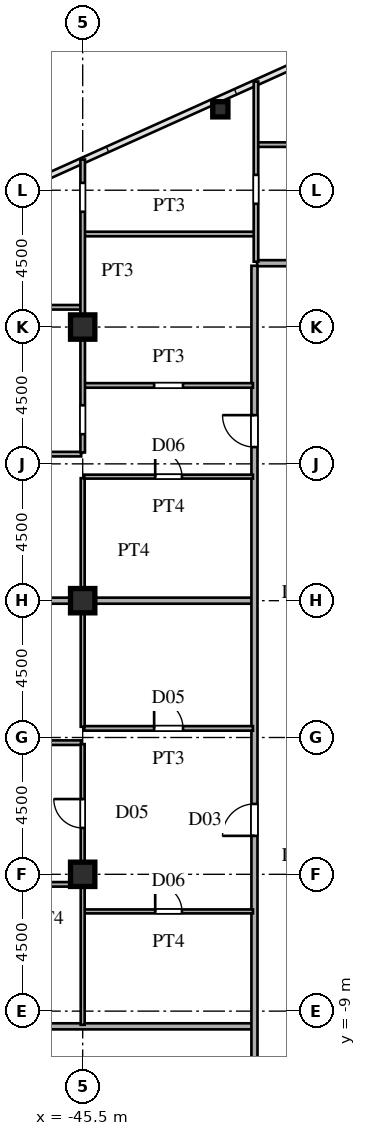
"""IFC4 building model, lengths in metres.
Left out: names, types, materials, properties, quantities, classifications, styles, units other than length and angle.
Written with IfcOpenShell. Run it as: python <this file> out.ifc"""

import sys

from ifc_helpers import new_model, si_unit, direction, frame, frame_2d, origin, origin_2d, place, context, subcontext, project, spatial, rectangle, hollow_rectangle, i_section, extrude, source, transform, mapped, element, fill, save


model = new_model("IFC4")
c1 = context("Model", 3, precision=1e-05, world=origin(), true_north=direction((0.0, 1.0)))
c2 = subcontext(c1, "Body", "Model", "MODEL_VIEW")
j1 = project(units=[si_unit("LENGTHUNIT", "METRE"), si_unit("PLANEANGLEUNIT", "RADIAN")], contexts=[c1])
p1 = place(None, origin())
s1 = spatial("IfcSite", under=j1, at=p1, CompositionType="ELEMENT")
p2 = place(p1, origin())
s2 = spatial("IfcBuilding", under=s1, at=p2, CompositionType="ELEMENT")
p3 = place(p2, frame((0.0, 0.0, 83.7)))
s3 = spatial("IfcBuildingStorey", under=s2, at=p3, CompositionType="ELEMENT", Elevation=83.7)
m1 = source(origin(), c2, "Body", "SweptSolid", [
    extrude(i_section(OverallWidth=0.8, OverallDepth=0.8, WebThickness=0.032, FlangeThickness=0.05, at=origin_2d()), origin(), (0.0, 0.0, 1.0), 3.6),
])
for number, where, z_axis, x_axis in (
    (1, (-45.5, -4.5, 0.0), (0.0, 0.0, 1.0), (1.0, 0.0, 0.0)),
    (2, (-45.5, 4.5, 0.0), (0.0, 0.0, 1.0), (1.0, 0.0, 0.0)),
    (3, (-45.5, 13.5, 0.0), (0.0, 0.0, 1.0), (1.0, 0.0, 0.0)),
):
    element("IfcColumn", number, at=place(p3, frame(where, z_axis=z_axis, x_axis=x_axis)), inside=s3, PredefinedType="COLUMN", context=c2, shape_type="MappedRepresentation", body=[
        mapped(m1, transform((0.0, 0.0, 0.0), scale=1.0)),
    ])
m2 = source(origin(), c2, "Body", "SweptSolid", [
    extrude(hollow_rectangle(XDim=0.5, YDim=0.5, WallThickness=0.02, at=origin_2d()), origin(), (0.0, 0.0, 1.0), 3.6),
])
p4 = place(p3, frame((-40.973, 20.661, 0.0), z_axis=(0.0, 0.0, 1.0), x_axis=(1.0, 0.0, 0.0)))
e4 = element("IfcColumn", 4, at=p4, inside=s3, PredefinedType="COLUMN", context=c2, shape_type="MappedRepresentation", body=[
    mapped(m2, transform((0.0, 0.0, 0.0), scale=1.0)),
])
p5 = place(p3, frame((-66.568, -9.5, 0.0), z_axis=(0.0, 0.0, 1.0), x_axis=(1.0, 0.0, 0.0)))
e5 = element("IfcWall", 5, at=p5, inside=s3, PredefinedType="PARTITIONING", context=c2, shape_type="SweptSolid", body=[
    extrude(rectangle(XDim=26.638, YDim=0.2, at=frame_2d((13.319, 0.0))), origin(), (0.0, 0.0, 1.0), 3.34),
])
p6 = place(p3, frame((-45.45, -5.72, 0.0), z_axis=(0.0, 0.0, 1.0), x_axis=(1.0, 0.0, 0.0)))
e6 = element("IfcWall", 6, at=p6, inside=s3, PredefinedType="PARTITIONING", context=c2, shape_type="SweptSolid", body=[
    extrude(rectangle(XDim=5.55, YDim=0.13, at=frame_2d((2.775, 0.0))), origin(), (0.0, 0.0, 1.0), 3.34),
])
p7 = place(p6, frame((2.335, 0.0, 0.0)))
e7 = element("IfcOpeningElement", 7, at=p7, cuts=e6, PredefinedType="OPENING", context=c2, shape_type="SweptSolid", body=[
    extrude(rectangle(XDim=0.88, YDim=2.1, at=frame_2d((0.44, 1.05))), frame((0.0, 0.075, 0.0), z_axis=(0.0, -1.0, 0.0), x_axis=(1.0, 0.0, 0.0)), (0.0, 0.0, 1.0), 0.15),
])
p8 = place(p3, frame((-71.035, -4.83, 0.0), z_axis=(0.0, 0.0, 1.0), x_axis=(1.0, 0.0, 0.0)))
e8 = element("IfcWall", 8, at=p8, inside=s3, PredefinedType="PARTITIONING", context=c2, shape_type="SweptSolid", body=[
    extrude(rectangle(XDim=25.485, YDim=0.15, at=frame_2d((12.742, 0.0))), origin(), (0.0, 0.0, 1.0), 3.34),
])
p9 = place(p8, frame((20.56, 0.0, 0.0)))
e9 = element("IfcOpeningElement", 9, at=p9, cuts=e8, PredefinedType="OPENING", context=c2, shape_type="SweptSolid", body=[
    extrude(rectangle(XDim=0.95, YDim=2.15, at=frame_2d((0.475, 1.075))), frame((0.0, 0.085, 0.0), z_axis=(0.0, -1.0, 0.0), x_axis=(1.0, 0.0, 0.0)), (0.0, 0.0, 1.0), 0.17),
])
p10 = place(p8, frame((13.21, 0.0, 0.0)))
e10 = element("IfcOpeningElement", 10, at=p10, cuts=e8, PredefinedType="OPENING", context=c2, shape_type="SweptSolid", body=[
    extrude(rectangle(XDim=0.95, YDim=2.15, at=frame_2d((0.475, 1.075))), frame((0.0, 0.085, 0.0), z_axis=(0.0, -1.0, 0.0), x_axis=(1.0, 0.0, 0.0)), (0.0, 0.0, 1.0), 0.17),
])
p11 = place(p3, frame((-71.035, -0.17, 0.0), z_axis=(0.0, 0.0, 1.0), x_axis=(1.0, 0.0, 0.0)))
e11 = element("IfcWall", 11, at=p11, inside=s3, PredefinedType="PARTITIONING", context=c2, shape_type="SweptSolid", body=[
    extrude(rectangle(XDim=25.485, YDim=0.15, at=frame_2d((12.742, 0.0))), origin(), (0.0, 0.0, 1.0), 3.34),
])
p12 = place(p11, frame((20.56, 0.0, 0.0)))
e12 = element("IfcOpeningElement", 12, at=p12, cuts=e11, PredefinedType="OPENING", context=c2, shape_type="SweptSolid", body=[
    extrude(rectangle(XDim=0.95, YDim=2.15, at=frame_2d((0.475, 1.075))), frame((0.0, 0.085, 0.0), z_axis=(0.0, -1.0, 0.0), x_axis=(1.0, 0.0, 0.0)), (0.0, 0.0, 1.0), 0.17),
])
p13 = place(p11, frame((13.21, 0.0, 0.0)))
e13 = element("IfcOpeningElement", 13, at=p13, cuts=e11, PredefinedType="OPENING", context=c2, shape_type="SweptSolid", body=[
    extrude(rectangle(XDim=0.95, YDim=2.15, at=frame_2d((0.475, 1.075))), frame((0.0, 0.085, 0.0), z_axis=(0.0, -1.0, 0.0), x_axis=(1.0, 0.0, 0.0)), (0.0, 0.0, 1.0), 0.17),
])
p14 = place(p3, frame((-45.45, 0.3, 0.0), z_axis=(0.0, 0.0, 1.0), x_axis=(1.0, 0.0, 0.0)))
e14 = element("IfcWall", 14, at=p14, inside=s3, PredefinedType="PARTITIONING", context=c2, shape_type="SweptSolid", body=[
    extrude(rectangle(XDim=5.55, YDim=0.15, at=frame_2d((2.775, 0.0))), origin(), (0.0, 0.0, 1.0), 3.34),
])
p15 = place(p14, frame((2.3, 0.0, 0.0)))
e15 = element("IfcOpeningElement", 15, at=p15, cuts=e14, PredefinedType="OPENING", context=c2, shape_type="SweptSolid", body=[
    extrude(rectangle(XDim=0.95, YDim=2.15, at=frame_2d((0.475, 1.075))), frame((0.0, 0.085, 0.0), z_axis=(0.0, -1.0, 0.0), x_axis=(1.0, 0.0, 0.0)), (0.0, 0.0, 1.0), 0.17),
])
p16 = place(p3, frame((-54.52, 4.5, 0.0), z_axis=(0.0, 0.0, 1.0), x_axis=(1.0, 0.0, 0.0)))
e16 = element("IfcWall", 16, at=p16, inside=s3, PredefinedType="PARTITIONING", context=c2, shape_type="SweptSolid", body=[
    extrude(rectangle(XDim=14.59, YDim=0.2, at=frame_2d((7.295, 0.0))), origin(), (0.0, 0.0, 1.0), 2.44),
])
p17 = place(p3, frame((-45.45, 8.58, 0.0), z_axis=(0.0, 0.0, 1.0), x_axis=(1.0, 0.0, 0.0)))
e17 = element("IfcWall", 17, at=p17, inside=s3, PredefinedType="PARTITIONING", context=c2, shape_type="SweptSolid", body=[
    extrude(rectangle(XDim=5.55, YDim=0.13, at=frame_2d((2.775, 0.0))), origin(), (0.0, 0.0, 1.0), 3.34),
])
p18 = place(p17, frame((2.335, 0.0, 0.0)))
e18 = element("IfcOpeningElement", 18, at=p18, cuts=e17, PredefinedType="OPENING", context=c2, shape_type="SweptSolid", body=[
    extrude(rectangle(XDim=0.88, YDim=2.1, at=frame_2d((0.44, 1.05))), frame((0.0, 0.075, 0.0), z_axis=(0.0, -1.0, 0.0), x_axis=(1.0, 0.0, 0.0)), (0.0, 0.0, 1.0), 0.15),
])
p19 = place(p3, frame((-66.979, 9.32, 0.0), z_axis=(0.0, 0.0, 1.0), x_axis=(1.0, 0.0, 0.0)))
e19 = element("IfcWall", 19, at=p19, inside=s3, PredefinedType="PARTITIONING", context=c2, shape_type="SweptSolid", body=[
    extrude(rectangle(XDim=21.429, YDim=0.15, at=frame_2d((10.714, 0.0))), origin(), (0.0, 0.0, 1.0), 3.34),
])
p20 = place(p19, frame((16.504, 0.0, 0.0)))
e20 = element("IfcOpeningElement", 20, at=p20, cuts=e19, PredefinedType="OPENING", context=c2, shape_type="SweptSolid", body=[
    extrude(rectangle(XDim=0.95, YDim=2.15, at=frame_2d((0.475, 1.075))), frame((0.0, 0.085, 0.0), z_axis=(0.0, -1.0, 0.0), x_axis=(1.0, 0.0, 0.0)), (0.0, 0.0, 1.0), 0.17),
])
p21 = place(p3, frame((-45.45, 11.58, 0.0), z_axis=(0.0, 0.0, 1.0), x_axis=(1.0, 0.0, 0.0)))
e21 = element("IfcWall", 21, at=p21, inside=s3, PredefinedType="PARTITIONING", context=c2, shape_type="SweptSolid", body=[
    extrude(rectangle(XDim=5.55, YDim=0.15, at=frame_2d((2.775, 0.0))), origin(), (0.0, 0.0, 1.0), 3.34),
])
p22 = place(p21, frame((2.3, 0.0, 0.0)))
e22 = element("IfcOpeningElement", 22, at=p22, cuts=e21, PredefinedType="OPENING", context=c2, shape_type="SweptSolid", body=[
    extrude(rectangle(XDim=0.95, YDim=2.15, at=frame_2d((0.475, 1.075))), frame((0.0, 0.085, 0.0), z_axis=(0.0, -1.0, 0.0), x_axis=(1.0, 0.0, 0.0)), (0.0, 0.0, 1.0), 0.17),
])
p23 = place(p3, frame((-54.45, 14.15, 0.0), z_axis=(0.0, 0.0, 1.0), x_axis=(1.0, 0.0, 0.0)))
e23 = element("IfcWall", 23, at=p23, inside=s3, PredefinedType="PARTITIONING", context=c2, shape_type="SweptSolid", body=[
    extrude(rectangle(XDim=8.9, YDim=0.15, at=frame_2d((4.45, 0.0))), origin(), (0.0, 0.0, 1.0), 3.34),
])
p24 = place(p23, frame((3.975, 0.0, 0.0)))
e24 = element("IfcOpeningElement", 24, at=p24, cuts=e23, PredefinedType="OPENING", context=c2, shape_type="SweptSolid", body=[
    extrude(rectangle(XDim=0.95, YDim=2.15, at=frame_2d((0.475, 1.075))), frame((0.0, 0.085, 0.0), z_axis=(0.0, -1.0, 0.0), x_axis=(1.0, 0.0, 0.0)), (0.0, 0.0, 1.0), 0.17),
])
p25 = place(p3, frame((-39.765, 15.6, 0.0), z_axis=(0.0, 0.0, 1.0), x_axis=(1.0, 0.0, 0.0)))
e25 = element("IfcWall", 25, at=p25, inside=s3, PredefinedType="PARTITIONING", context=c2, shape_type="SweptSolid", body=[
    extrude(rectangle(XDim=3.18, YDim=0.2, at=frame_2d((1.59, 0.0))), origin(), (0.0, 0.0, 1.0), 3.34),
])
p26 = place(p3, frame((-45.45, 16.56, 0.0), z_axis=(0.0, 0.0, 1.0), x_axis=(1.0, 0.0, 0.0)))
e26 = element("IfcWall", 26, at=p26, inside=s3, PredefinedType="PARTITIONING", context=c2, shape_type="SweptSolid", body=[
    extrude(rectangle(XDim=5.6, YDim=0.15, at=frame_2d((2.8, 0.0))), origin(), (0.0, 0.0, 1.0), 3.34),
])
p27 = place(p3, frame((-39.75, 19.5, 0.0), z_axis=(0.0, 0.0, 1.0), x_axis=(1.0, 0.0, 0.0)))
e27 = element("IfcWall", 27, at=p27, inside=s3, PredefinedType="PARTITIONING", context=c2, shape_type="SweptSolid", body=[
    extrude(rectangle(XDim=12.285, YDim=0.15, at=frame_2d((6.143, 0.0))), origin(), (0.0, 0.0, 1.0), 3.34),
])
p28 = place(p27, frame((5.625, 0.0, 0.0)))
e28 = element("IfcOpeningElement", 28, at=p28, cuts=e27, PredefinedType="OPENING", context=c2, shape_type="SweptSolid", body=[
    extrude(rectangle(XDim=0.95, YDim=2.15, at=frame_2d((0.475, 1.075))), frame((0.0, 0.085, 0.0), z_axis=(0.0, -1.0, 0.0), x_axis=(1.0, 0.0, 0.0)), (0.0, 0.0, 1.0), 0.17),
])
p29 = place(p3, frame((-45.5, -9.45, 0.0), z_axis=(0.0, 0.0, 1.0), x_axis=(0.0, 1.0, 0.0)))
e29 = element("IfcWall", 29, at=p29, inside=s3, PredefinedType="PARTITIONING", context=c2, shape_type="SweptSolid", body=[
    extrude(rectangle(XDim=9.233, YDim=0.13, at=frame_2d((4.616, 0.0))), origin(), (0.0, 0.0, 1.0), 2.44),
])
p30 = place(p29, frame((6.475, 0.0, 0.0)))
e30 = element("IfcOpeningElement", 30, at=p30, cuts=e29, PredefinedType="OPENING", context=c2, shape_type="SweptSolid", body=[
    extrude(rectangle(XDim=0.95, YDim=2.15, at=frame_2d((0.475, 1.075))), frame((0.0, 0.075, 0.0), z_axis=(0.0, -1.0, 0.0), x_axis=(1.0, 0.0, 0.0)), (0.0, 0.0, 1.0), 0.15),
])
p31 = place(p3, frame((-45.5, 0.352, 0.0), z_axis=(0.0, 0.0, 1.0), x_axis=(0.0, 1.0, 0.0)))
e31 = element("IfcWall", 31, at=p31, inside=s3, PredefinedType="PARTITIONING", context=c2, shape_type="SweptSolid", body=[
    extrude(rectangle(XDim=8.176, YDim=0.13, at=frame_2d((4.088, 0.0))), origin(), (0.0, 0.0, 1.0), 2.44),
])
p32 = place(p3, frame((-45.5, 9.375, 0.0), z_axis=(0.0, 0.0, 1.0), x_axis=(0.0, 1.0, 0.0)))
e32 = element("IfcWall", 32, at=p32, inside=s3, PredefinedType="PARTITIONING", context=c2, shape_type="SweptSolid", body=[
    extrude(rectangle(XDim=4.145, YDim=0.15, at=frame_2d((2.073, 0.0))), origin(), (0.0, 0.0, 1.0), 2.44),
])
p33 = place(p32, frame((0.601, 0.0, 0.0)))
e33 = element("IfcOpeningElement", 33, at=p33, cuts=e32, PredefinedType="OPENING", context=c2, shape_type="SweptSolid", body=[
    extrude(rectangle(XDim=0.95, YDim=2.15, at=frame_2d((0.475, 1.075))), frame((0.0, 0.085, 0.0), z_axis=(0.0, -1.0, 0.0), x_axis=(1.0, 0.0, 0.0)), (0.0, 0.0, 1.0), 0.17),
])
p34 = place(p3, frame((-45.5, 13.52, 0.0), z_axis=(0.0, 0.0, 1.0), x_axis=(0.0, 1.0, 0.0)))
e34 = element("IfcWall", 34, at=p34, inside=s3, PredefinedType="PARTITIONING", context=c2, shape_type="SweptSolid", body=[
    extrude(rectangle(XDim=5.49, YDim=0.15, at=frame_2d((2.745, 0.0))), origin(), (0.0, 0.0, 1.0), 3.34),
])
p35 = place(p34, frame((3.772, 0.0, 0.0)))
e35 = element("IfcOpeningElement", 35, at=p35, cuts=e34, PredefinedType="OPENING", context=c2, shape_type="SweptSolid", body=[
    extrude(rectangle(XDim=0.95, YDim=2.15, at=frame_2d((0.475, 1.075))), frame((0.0, 0.085, 0.0), z_axis=(0.0, -1.0, 0.0), x_axis=(1.0, 0.0, 0.0)), (0.0, 0.0, 1.0), 0.17),
])
p36 = place(p3, frame((-39.85, -15.515, 0.0), z_axis=(0.0, 0.0, 1.0), x_axis=(0.0, 1.0, 0.0)))
e36 = element("IfcWall", 36, at=p36, inside=s3, PredefinedType="PARTITIONING", context=c2, shape_type="SweptSolid", body=[
    extrude(rectangle(XDim=31.03, YDim=0.2, at=frame_2d((15.515, 0.0))), origin(), (0.0, 0.0, 1.0), 3.34),
])
p37 = place(p36, frame((2.44, 0.0, 0.0)))
e37 = element("IfcOpeningElement", 37, at=p37, cuts=e36, PredefinedType="OPENING", context=c2, shape_type="SweptSolid", body=[
    extrude(rectangle(XDim=1.05, YDim=2.25, at=frame_2d((0.525, 1.125))), frame((0.0, 0.11, 0.0), z_axis=(0.0, -1.0, 0.0), x_axis=(1.0, 0.0, 0.0)), (0.0, 0.0, 1.0), 0.22),
])
p38 = place(p36, frame((12.28, 0.0, 0.0)))
e38 = element("IfcOpeningElement", 38, at=p38, cuts=e36, PredefinedType="OPENING", context=c2, shape_type="SweptSolid", body=[
    extrude(rectangle(XDim=1.05, YDim=2.25, at=frame_2d((0.525, 1.125))), frame((0.0, 0.11, 0.0), z_axis=(0.0, -1.0, 0.0), x_axis=(1.0, 0.0, 0.0)), (0.0, 0.0, 1.0), 0.22),
])
p39 = place(p36, frame((25.067, 0.0, 0.0)))
e39 = element("IfcOpeningElement", 39, at=p39, cuts=e36, PredefinedType="OPENING", context=c2, shape_type="SweptSolid", body=[
    extrude(rectangle(XDim=1.05, YDim=2.25, at=frame_2d((0.525, 1.125))), frame((0.0, 0.11, 0.0), z_axis=(0.0, -1.0, 0.0), x_axis=(1.0, 0.0, 0.0)), (0.0, 0.0, 1.0), 0.22),
])
p40 = place(p3, frame((-39.8, 15.65, 0.0), z_axis=(0.0, 0.0, 1.0), x_axis=(0.0, 1.0, 0.0)))
e40 = element("IfcWall", 40, at=p40, inside=s3, PredefinedType="PARTITIONING", context=c2, shape_type="SweptSolid", body=[
    extrude(rectangle(XDim=5.925, YDim=0.15, at=frame_2d((2.962, 0.0))), origin(), (0.0, 0.0, 1.0), 3.34),
])
p41 = place(p40, frame((1.904, 0.0, 0.0)))
e41 = element("IfcOpeningElement", 41, at=p41, cuts=e40, PredefinedType="OPENING", context=c2, shape_type="SweptSolid", body=[
    extrude(rectangle(XDim=0.95, YDim=2.15, at=frame_2d((0.475, 1.075))), frame((0.0, 0.085, 0.0), z_axis=(0.0, -1.0, 0.0), x_axis=(1.0, 0.0, 0.0)), (0.0, 0.0, 1.0), 0.17),
])
m3 = source(origin(), c2, "Body", "SweptSolid", [
    extrude(rectangle(XDim=0.88, YDim=2.1, at=frame_2d((0.44, 1.05))), frame((0.0, 0.025, 0.0), z_axis=(0.0, -1.0, 0.0), x_axis=(1.0, 0.0, 0.0)), (0.0, 0.0, 1.0), 0.05),
])
p42 = place(p7, origin())
e42 = element("IfcDoor", 42, at=p42, inside=s3, OperationType="SINGLE_SWING_LEFT", PredefinedType="DOOR", context=c2, shape_type="MappedRepresentation", body=[
    mapped(m3, transform((0.0, 0.0, 0.0), scale=1.0)),
])
fill(e7, e42)
m4 = source(origin(), c2, "Body", "SweptSolid", [
    extrude(rectangle(XDim=0.95, YDim=2.15, at=frame_2d((0.475, 1.075))), frame((0.0, 0.025, 0.0), z_axis=(0.0, -1.0, 0.0), x_axis=(1.0, 0.0, 0.0)), (0.0, 0.0, 1.0), 0.05),
])
p43 = place(p15, origin())
e43 = element("IfcDoor", 43, at=p43, inside=s3, OperationType="SINGLE_SWING_LEFT", PredefinedType="DOOR", context=c2, shape_type="MappedRepresentation", body=[
    mapped(m4, transform((0.0, 0.0, 0.0), scale=1.0)),
])
fill(e15, e43)
p44 = place(p18, origin())
e44 = element("IfcDoor", 44, at=p44, inside=s3, OperationType="SINGLE_SWING_LEFT", PredefinedType="DOOR", context=c2, shape_type="MappedRepresentation", body=[
    mapped(m3, transform((0.0, 0.0, 0.0), scale=1.0)),
])
fill(e18, e44)
p45 = place(p30, origin())
e45 = element("IfcDoor", 45, at=p45, inside=s3, OperationType="SINGLE_SWING_RIGHT", PredefinedType="DOOR", context=c2, shape_type="MappedRepresentation", body=[
    mapped(m4, transform((0.0, 0.0, 0.0), scale=1.0)),
])
fill(e30, e45)
m5 = source(origin(), c2, "Body", "SweptSolid", [
    extrude(rectangle(XDim=1.05, YDim=2.25, at=frame_2d((0.525, 1.125))), frame((0.0, 0.025, 0.0), z_axis=(0.0, -1.0, 0.0), x_axis=(1.0, 0.0, 0.0)), (0.0, 0.0, 1.0), 0.05),
])
p46 = place(p38, origin())
e46 = element("IfcDoor", 46, at=p46, inside=s3, OperationType="SINGLE_SWING_LEFT", PredefinedType="DOOR", context=c2, shape_type="MappedRepresentation", body=[
    mapped(m5, transform((0.0, 0.0, 0.0), scale=1.0)),
])
fill(e38, e46)
p47 = place(p39, origin())
e47 = element("IfcDoor", 47, at=p47, inside=s3, OperationType="SINGLE_SWING_RIGHT", PredefinedType="DOOR", context=c2, shape_type="MappedRepresentation", body=[
    mapped(m5, transform((0.0, 0.0, 0.0), scale=1.0)),
])
fill(e39, e47)
save(model, sys.argv[1])
